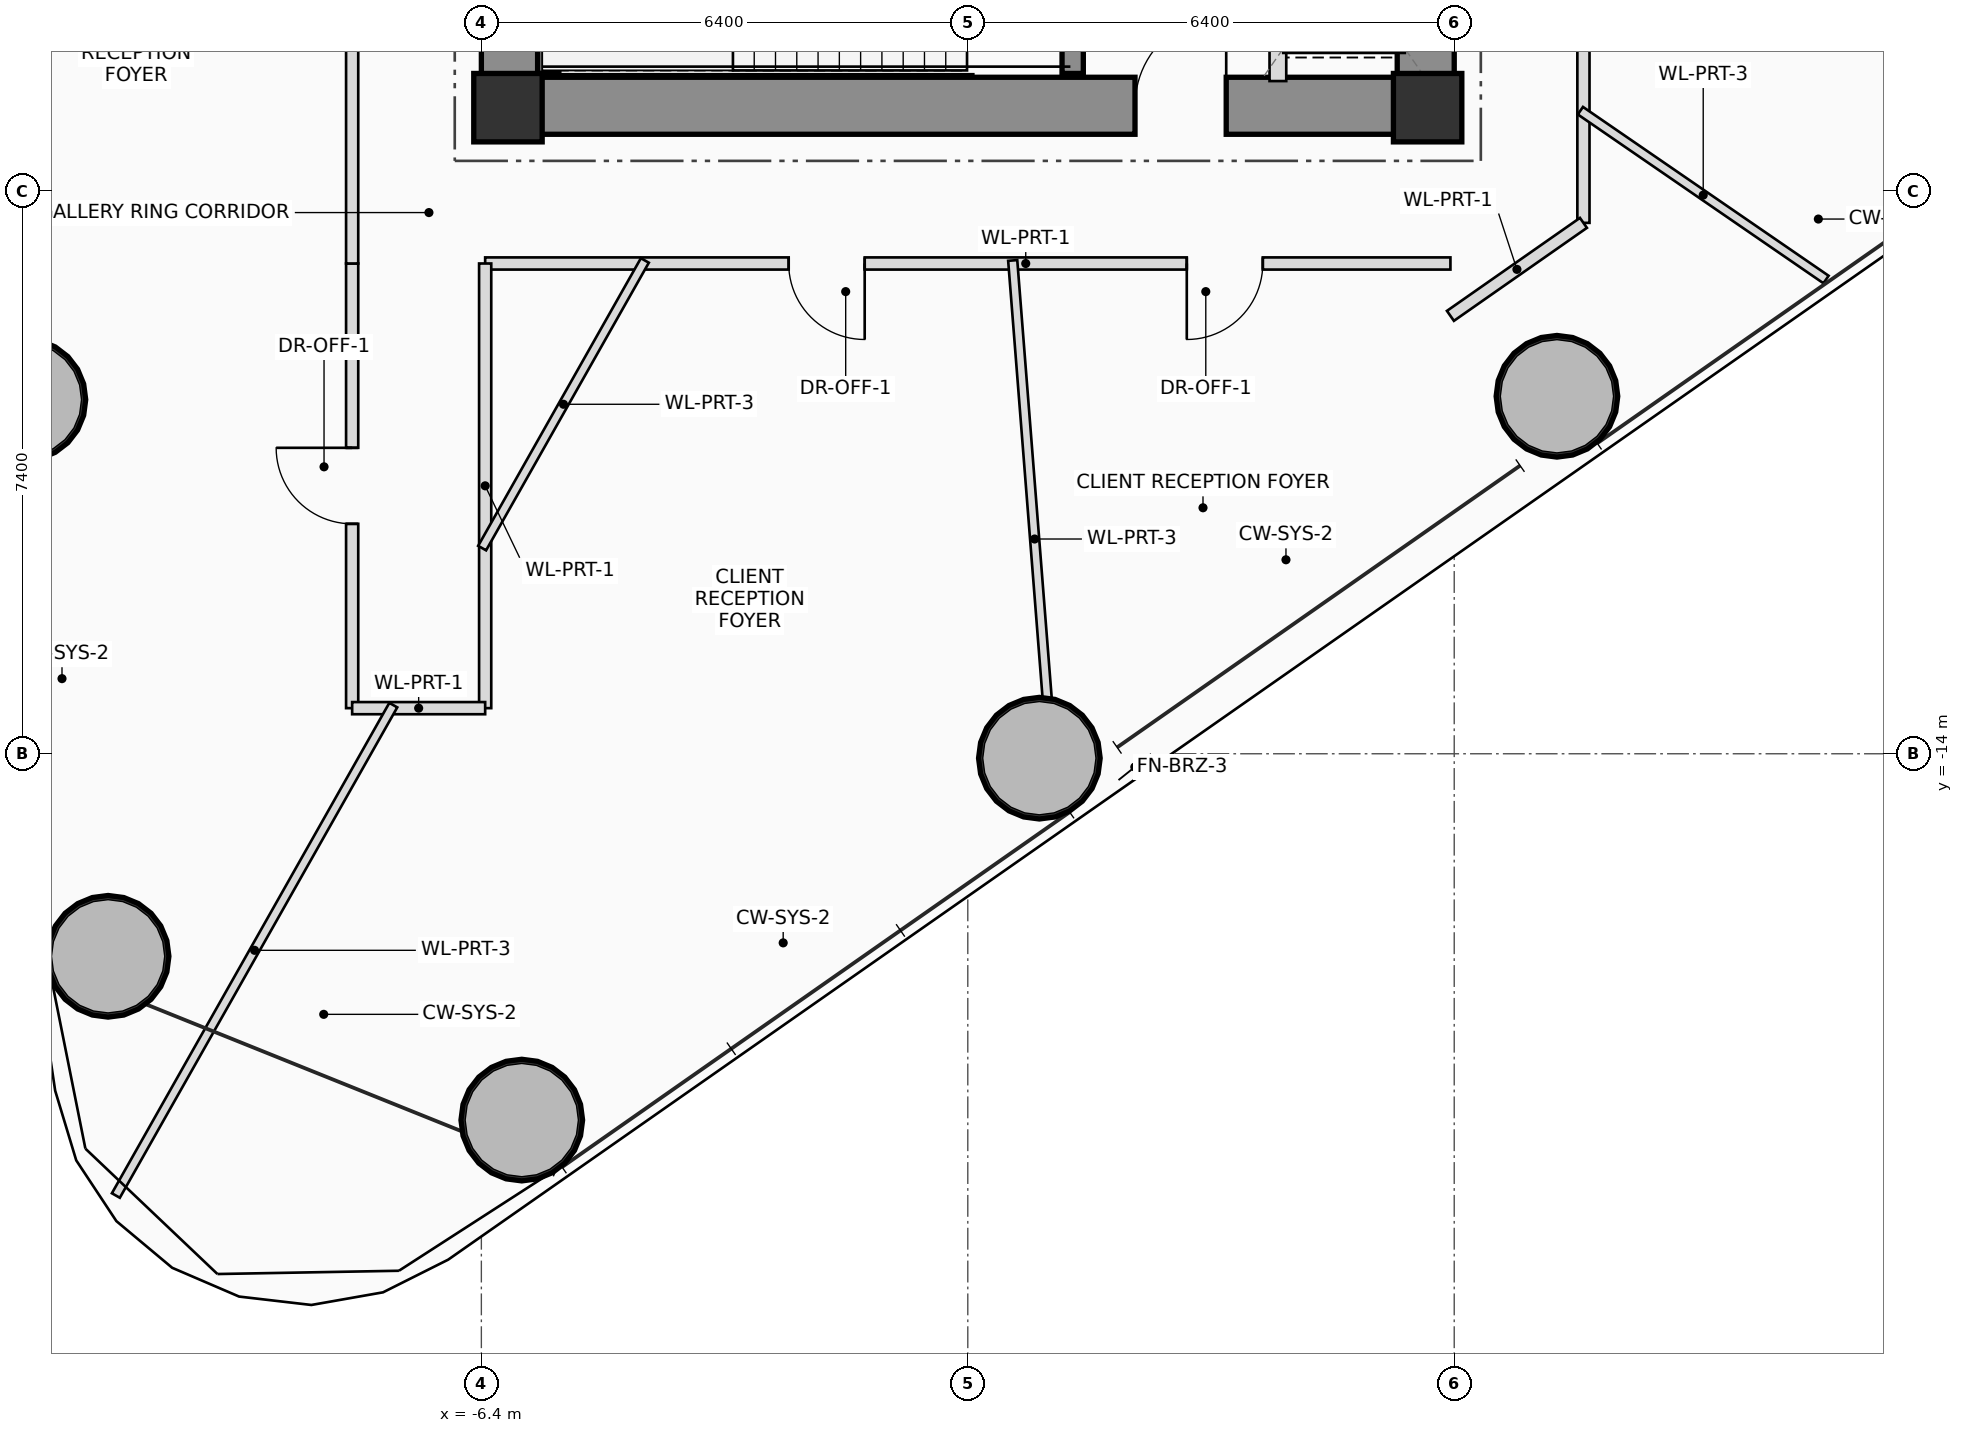
"""IFC4 building model, lengths in metres.
Left out: names, types, materials, properties, quantities, classifications, styles, units other than length and angle.
Written with IfcOpenShell. Run it as: python <this file> out.ifc"""

import sys

from ifc_helpers import new_model, si_unit, direction, frame, frame_2d, origin, origin_2d, place, context, subcontext, project, spatial, rectangle, hollow_circle, extrude, source, transform, mapped, element, fill, save


model = new_model("IFC4")
c1 = context("Model", 3, precision=1e-05, world=origin(), true_north=direction((0.0, 1.0)))
c2 = subcontext(c1, "Body", "Model", "MODEL_VIEW")
j1 = project(units=[si_unit("LENGTHUNIT", "METRE"), si_unit("PLANEANGLEUNIT", "RADIAN")], contexts=[c1])
p1 = place(None, origin())
s1 = spatial("IfcSite", under=j1, at=p1, CompositionType="ELEMENT")
p2 = place(p1, origin())
s2 = spatial("IfcBuilding", under=s1, at=p2, CompositionType="ELEMENT")
p3 = place(p2, frame((0.0, 0.0, 66.05)))
s3 = spatial("IfcBuildingStorey", under=s2, at=p3, CompositionType="ELEMENT", Elevation=66.05)
m1 = source(origin(), c2, "Body", "SweptSolid", [
    extrude(rectangle(XDim=0.9, YDim=0.9, at=origin_2d()), origin(), (0.0, 0.0, 1.0), 3.75),
])
for number, where, z_axis, x_axis in (
    (1, (-6.05, -5.5, 0.0), (0.0, 0.0, 1.0), (1.0, 0.0, 0.0)),
    (2, (6.05, -5.5, 0.0), (0.0, 0.0, 1.0), (1.0, 0.0, 0.0)),
):
    element("IfcColumn", number, at=place(p3, frame(where, z_axis=z_axis, x_axis=x_axis)), inside=s3, PredefinedType="COLUMN", context=c2, shape_type="MappedRepresentation", body=[
        mapped(m1, transform((0.0, 0.0, 0.0), scale=1.0)),
    ])
p4 = place(p3, frame((-6.4, -5.475, 0.0), z_axis=(0.0, 0.0, 1.0), x_axis=(1.0, 0.0, 0.0)))
e3 = element("IfcWall", 3, at=p4, inside=s3, PredefinedType="SHEAR", context=c2, shape_type="SweptSolid", body=[
    extrude(rectangle(XDim=12.8, YDim=0.75, at=frame_2d((6.4, 0.0))), origin(), (0.0, 0.0, 1.0), 3.75),
])
p5 = place(p4, frame((8.6, 0.0, 0.0)))
e4 = element("IfcOpeningElement", 4, at=p5, cuts=e3, PredefinedType="OPENING", context=c2, shape_type="SweptSolid", body=[
    extrude(rectangle(XDim=1.2, YDim=2.2, at=frame_2d((0.6, 1.1))), frame((0.0, 0.385, 0.0), z_axis=(0.0, -1.0, 0.0), x_axis=(1.0, 0.0, 0.0)), (0.0, 0.0, 1.0), 0.77),
])
p6 = place(p3, frame((6.025, -5.1, 0.0), z_axis=(0.0, 0.0, 1.0), x_axis=(0.0, 1.0, 0.0)))
e5 = element("IfcWall", 5, at=p6, inside=s3, PredefinedType="SHEAR", context=c2, shape_type="SweptSolid", body=[
    extrude(rectangle(XDim=10.2, YDim=0.75, at=frame_2d((5.1, 0.0))), origin(), (0.0, 0.0, 1.0), 3.75),
])
p7 = place(p3, frame((-6.025, -5.1, 0.0), z_axis=(0.0, 0.0, 1.0), x_axis=(0.0, 1.0, 0.0)))
e6 = element("IfcWall", 6, at=p7, inside=s3, PredefinedType="SHEAR", context=c2, shape_type="SweptSolid", body=[
    extrude(rectangle(XDim=3.35, YDim=0.75, at=frame_2d((1.675, 0.0))), origin(), (0.0, 0.0, 1.0), 3.75),
])
p8 = place(p3, frame((-5.52, -5.05, 0.0), z_axis=(0.0, 0.0, 1.0), x_axis=(0.0, 1.0, 0.0)))
e7 = element("IfcWall", 7, at=p8, inside=s3, PredefinedType="SHEAR", context=c2, shape_type="SweptSolid", body=[
    extrude(rectangle(XDim=2.75, YDim=0.28, at=frame_2d((1.375, 0.0))), origin(), (0.0, 0.0, 1.0), 3.75),
])
p9 = place(p3, frame((1.38, -5.05, 0.0), z_axis=(0.0, 0.0, 1.0), x_axis=(0.0, 1.0, 0.0)))
e8 = element("IfcWall", 8, at=p9, inside=s3, PredefinedType="SHEAR", context=c2, shape_type="SweptSolid", body=[
    extrude(rectangle(XDim=0.8, YDim=0.28, at=frame_2d((0.4, 0.0))), origin(), (0.0, 0.0, 1.0), 3.75),
])
m2 = source(origin(), c2, "Body", "SweptSolid", [
    extrude(hollow_circle(Radius=0.8, WallThickness=0.055, at=origin_2d()), origin(), (0.0, 0.0, 1.0), 3.75),
])
for number, where, z_axis, x_axis in (
    (9, (-5.868, -18.819, 0.0), (0.0, 0.0, 1.0), (1.0, 0.0, 0.0)),
    (10, (0.942, -14.058, 0.0), (0.0, 0.0, 1.0), (1.0, 0.0, 0.0)),
    (11, (7.752, -9.297, 0.0), (0.0, 0.0, 1.0), (1.0, 0.0, 0.0)),
    (12, (-12.406, -9.341, 0.0), (0.0, 0.0, 1.0), (1.0, 0.0, 0.0)),
    (13, (-11.311, -16.665, 0.0), (0.0, 0.0, 1.0), (1.0, 0.0, 0.0)),
):
    element("IfcColumn", number, at=place(p3, frame(where, z_axis=z_axis, x_axis=x_axis)), inside=s3, PredefinedType="COLUMN", context=c2, shape_type="MappedRepresentation", body=[
        mapped(m2, transform((0.0, 0.0, 0.0), scale=1.0)),
    ])
p10 = place(p3, frame((4.08, -5.15, 0.0), z_axis=(0.0, 0.0, 1.0), x_axis=(0.0, 1.0, 0.0)))
e14 = element("IfcWall", 14, at=p10, inside=s3, PredefinedType="PLUMBINGWALL", context=c2, shape_type="SweptSolid", body=[
    extrude(rectangle(XDim=2.95, YDim=0.22, at=frame_2d((1.475, 0.0))), origin(), (0.0, 0.0, 1.0), 3.545),
])
p11 = place(p10, frame((0.95, 0.0, 0.0)))
e15 = element("IfcOpeningElement", 15, at=p11, cuts=e14, PredefinedType="OPENING", context=c2, shape_type="SweptSolid", body=[
    extrude(rectangle(XDim=1.2, YDim=2.25, at=frame_2d((0.6, 1.125))), frame((0.0, 0.12, 0.0), z_axis=(0.0, -1.0, 0.0), x_axis=(1.0, 0.0, 0.0)), (0.0, 0.0, 1.0), 0.24),
])
p12 = place(p3, frame((-8.1, -13.4, 0.0), z_axis=(0.0, 0.0, 1.0), x_axis=(0.0, 1.0, 0.0)))
e16 = element("IfcWall", 16, at=p12, inside=s3, PredefinedType="PARTITIONING", context=c2, shape_type="SweptSolid", body=[
    extrude(rectangle(XDim=5.85, YDim=0.16, at=frame_2d((2.925, 0.0))), origin(), (0.0, 0.0, 1.0), 2.85),
])
p13 = place(p12, frame((2.425, 0.0, 0.0)))
e17 = element("IfcOpeningElement", 17, at=p13, cuts=e16, PredefinedType="OPENING", context=c2, shape_type="SweptSolid", body=[
    extrude(rectangle(XDim=1.0, YDim=2.25, at=frame_2d((0.5, 1.125))), frame((0.0, 0.09, 0.0), z_axis=(0.0, -1.0, 0.0), x_axis=(1.0, 0.0, 0.0)), (0.0, 0.0, 1.0), 0.18),
])
p14 = place(p3, frame((-8.1, -7.55, 0.0), z_axis=(0.0, 0.0, 1.0), x_axis=(0.0, 1.0, 0.0)))
e18 = element("IfcWall", 18, at=p14, inside=s3, PredefinedType="PARTITIONING", context=c2, shape_type="SweptSolid", body=[
    extrude(rectangle(XDim=15.1, YDim=0.16, at=frame_2d((7.55, 0.0))), origin(), (0.0, 0.0, 1.0), 2.85),
])
p15 = place(p14, frame((8.855, 0.0, 0.0)))
e19 = element("IfcOpeningElement", 19, at=p15, cuts=e18, PredefinedType="OPENING", context=c2, shape_type="SweptSolid", body=[
    extrude(rectangle(XDim=1.0, YDim=2.25, at=frame_2d((0.5, 1.125))), frame((0.0, 0.09, 0.0), z_axis=(0.0, -1.0, 0.0), x_axis=(1.0, 0.0, 0.0)), (0.0, 0.0, 1.0), 0.18),
])
p16 = place(p14, frame((12.865, 0.0, 0.0)))
e20 = element("IfcOpeningElement", 20, at=p16, cuts=e18, PredefinedType="OPENING", context=c2, shape_type="SweptSolid", body=[
    extrude(rectangle(XDim=1.0, YDim=2.25, at=frame_2d((0.5, 1.125))), frame((0.0, 0.09, 0.0), z_axis=(0.0, -1.0, 0.0), x_axis=(1.0, 0.0, 0.0)), (0.0, 0.0, 1.0), 0.18),
])
p17 = place(p3, frame((8.1, -0.02, 0.0), z_axis=(0.0, 0.0, 1.0), x_axis=(0.0, -1.0, 0.0)))
e21 = element("IfcWall", 21, at=p17, inside=s3, PredefinedType="PARTITIONING", context=c2, shape_type="SweptSolid", body=[
    extrude(rectangle(XDim=6.995, YDim=0.16, at=frame_2d((3.498, 0.0))), origin(), (0.0, 0.0, 1.0), 2.85),
])
p18 = place(p3, frame((8.1, -7.015, 0.0), z_axis=(0.0, 0.0, 1.0), x_axis=(-0.81953260104, -0.573032560883, 0.0)))
e22 = element("IfcWall", 22, at=p18, inside=s3, PredefinedType="PARTITIONING", context=c2, shape_type="SweptSolid", body=[
    extrude(rectangle(XDim=2.135, YDim=0.16, at=frame_2d((1.068, 0.0))), origin(), (0.0, 0.0, 1.0), 2.85),
])
p19 = place(p3, frame((6.35, -7.55, 0.0), z_axis=(0.0, 0.0, 1.0), x_axis=(-1.0, 0.0, 0.0)))
e23 = element("IfcWall", 23, at=p19, inside=s3, PredefinedType="PARTITIONING", context=c2, shape_type="SweptSolid", body=[
    extrude(rectangle(XDim=12.7, YDim=0.16, at=frame_2d((6.35, 0.0))), origin(), (0.0, 0.0, 1.0), 2.85),
])
p20 = place(p19, frame((2.469, 0.0, 0.0)))
e24 = element("IfcOpeningElement", 24, at=p20, cuts=e23, PredefinedType="OPENING", context=c2, shape_type="SweptSolid", body=[
    extrude(rectangle(XDim=1.0, YDim=2.25, at=frame_2d((0.5, 1.125))), frame((0.0, 0.09, 0.0), z_axis=(0.0, -1.0, 0.0), x_axis=(1.0, 0.0, 0.0)), (0.0, 0.0, 1.0), 0.18),
])
p21 = place(p19, frame((7.707, 0.0, 0.0)))
e25 = element("IfcOpeningElement", 25, at=p21, cuts=e23, PredefinedType="OPENING", context=c2, shape_type="SweptSolid", body=[
    extrude(rectangle(XDim=1.0, YDim=2.25, at=frame_2d((0.5, 1.125))), frame((0.0, 0.09, 0.0), z_axis=(0.0, -1.0, 0.0), x_axis=(1.0, 0.0, 0.0)), (0.0, 0.0, 1.0), 0.18),
])
p22 = place(p3, frame((-6.35, -7.55, 0.0), z_axis=(0.0, 0.0, 1.0), x_axis=(0.0, -1.0, 0.0)))
e26 = element("IfcWall", 26, at=p22, inside=s3, PredefinedType="PARTITIONING", context=c2, shape_type="SweptSolid", body=[
    extrude(rectangle(XDim=5.85, YDim=0.16, at=frame_2d((2.925, 0.0))), origin(), (0.0, 0.0, 1.0), 3.05),
])
p23 = place(p3, frame((-6.35, -13.4, 0.0), z_axis=(0.0, 0.0, 1.0), x_axis=(-1.0, 0.0, 0.0)))
e27 = element("IfcWall", 27, at=p23, inside=s3, PredefinedType="PARTITIONING", context=c2, shape_type="SweptSolid", body=[
    extrude(rectangle(XDim=1.75, YDim=0.16, at=frame_2d((0.875, 0.0))), origin(), (0.0, 0.0, 1.0), 3.545),
])
p24 = place(p3, frame((-4.249, -7.51, 0.0), z_axis=(0.0, 0.0, 1.0), x_axis=(-0.492403224766, -0.870367200807, 0.0)))
e28 = element("IfcWall", 28, at=p24, inside=s3, PredefinedType="PARTITIONING", context=c2, shape_type="SweptSolid", body=[
    extrude(rectangle(XDim=4.348, YDim=0.12, at=frame_2d((2.174, 0.0))), origin(), (0.0, 0.0, 1.0), 2.85),
])
p25 = place(p3, frame((-7.559, -13.36, 0.0), z_axis=(0.0, 0.0, 1.0), x_axis=(-0.492445728691, -0.870343153184, 0.0)))
e29 = element("IfcWall", 29, at=p25, inside=s3, PredefinedType="PARTITIONING", context=c2, shape_type="SweptSolid", body=[
    extrude(rectangle(XDim=7.413, YDim=0.12, at=frame_2d((3.707, 0.0))), origin(), (0.0, 0.0, 1.0), 3.01),
])
p26 = place(p3, frame((0.591, -7.51, 0.0), z_axis=(0.0, 0.0, 1.0), x_axis=(0.078466268921, -0.996916769165, 0.0)))
e30 = element("IfcWall", 30, at=p26, inside=s3, PredefinedType="PARTITIONING", context=c2, shape_type="SweptSolid", body=[
    extrude(rectangle(XDim=7.352, YDim=0.12, at=frame_2d((3.676, 0.0))), origin(), (0.0, 0.0, 1.0), 3.05),
])
p27 = place(p3, frame((8.06, -5.54, 0.0), z_axis=(0.0, 0.0, 1.0), x_axis=(0.824103676806, -0.566438990426, 0.0)))
e31 = element("IfcWall", 31, at=p27, inside=s3, PredefinedType="PARTITIONING", context=c2, shape_type="SweptSolid", body=[
    extrude(rectangle(XDim=3.922, YDim=0.12, at=frame_2d((1.961, 0.0))), origin(), (0.0, 0.0, 1.0), 3.01),
])
p28 = place(p5, origin())
e32 = element("IfcDoor", 32, at=p28, inside=s3, OperationType="SINGLE_SWING_RIGHT", PredefinedType="DOOR", context=c2, shape_type="SweptSolid", body=[
    extrude(rectangle(XDim=1.2, YDim=2.2, at=frame_2d((0.6, 1.1))), frame((0.0, 0.025, 0.0), z_axis=(0.0, -1.0, 0.0), x_axis=(1.0, 0.0, 0.0)), (0.0, 0.0, 1.0), 0.05),
])
fill(e4, e32)
p29 = place(p13, origin())
e33 = element("IfcDoor", 33, at=p29, inside=s3, OperationType="SINGLE_SWING_RIGHT", PredefinedType="DOOR", context=c2, shape_type="SweptSolid", body=[
    extrude(rectangle(XDim=1.0, YDim=2.25, at=frame_2d((0.5, 1.125))), frame((0.0, 0.025, 0.0), z_axis=(0.0, -1.0, 0.0), x_axis=(1.0, 0.0, 0.0)), (0.0, 0.0, 1.0), 0.05),
])
fill(e17, e33)
p30 = place(p20, origin())
e34 = element("IfcDoor", 34, at=p30, inside=s3, OperationType="SINGLE_SWING_RIGHT", PredefinedType="DOOR", context=c2, shape_type="SweptSolid", body=[
    extrude(rectangle(XDim=1.0, YDim=2.25, at=frame_2d((0.5, 1.125))), frame((0.0, 0.025, 0.0), z_axis=(0.0, -1.0, 0.0), x_axis=(1.0, 0.0, 0.0)), (0.0, 0.0, 1.0), 0.05),
])
fill(e24, e34)
p31 = place(p21, origin())
e35 = element("IfcDoor", 35, at=p31, inside=s3, OperationType="SINGLE_SWING_LEFT", PredefinedType="DOOR", context=c2, shape_type="SweptSolid", body=[
    extrude(rectangle(XDim=1.0, YDim=2.25, at=frame_2d((0.5, 1.125))), frame((0.0, 0.025, 0.0), z_axis=(0.0, -1.0, 0.0), x_axis=(1.0, 0.0, 0.0)), (0.0, 0.0, 1.0), 0.05),
])
fill(e25, e35)
save(model, sys.argv[1])
